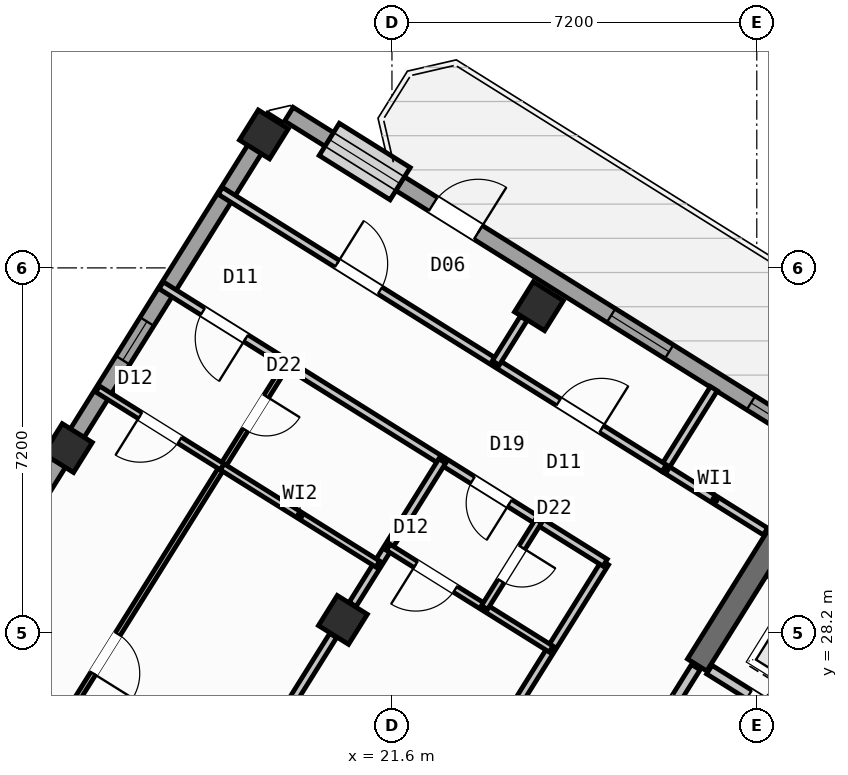
"""IFC4 building model, lengths in metres.
Left out: names, types, materials, properties, quantities, classifications, styles, units other than length and angle.
Written with IfcOpenShell. Run it as: python <this file> out.ifc"""

import sys

from ifc_helpers import new_model, si_unit, direction, frame, frame_2d, origin, origin_2d, place, context, subcontext, project, spatial, rectangle, hollow_rectangle, extrude, source, transform, mapped, element, fill, save


model = new_model("IFC4")
c1 = context("Model", 3, precision=1e-05, world=origin(), true_north=direction((0.0, 1.0)))
c2 = subcontext(c1, "Body", "Model", "MODEL_VIEW")
j1 = project(units=[si_unit("LENGTHUNIT", "METRE"), si_unit("PLANEANGLEUNIT", "RADIAN")], contexts=[c1])
p1 = place(None, origin())
s1 = spatial("IfcSite", under=j1, at=p1, CompositionType="ELEMENT")
p2 = place(p1, origin())
s2 = spatial("IfcBuilding", under=s1, at=p2, CompositionType="ELEMENT")
p3 = place(p2, frame((0.0, 0.0, 288.0)))
s3 = spatial("IfcBuildingStorey", under=s2, at=p3, CompositionType="ELEMENT", Elevation=288.0)
p4 = place(p3, frame((29.544, 30.636, 0.0), z_axis=(0.0, 0.0, 1.0), x_axis=(-0.529902075036, -0.848058836916, 0.0)))
e1 = element("IfcWall", 1, at=p4, inside=s3, PredefinedType="SHEAR", context=c2, shape_type="SweptSolid", body=[
    extrude(rectangle(XDim=3.625, YDim=0.45, at=frame_2d((1.812, 0.0))), origin(), (0.0, 0.0, 1.0), 3.35),
])
m1 = source(origin(), c2, "Body", "SweptSolid", [
    extrude(hollow_rectangle(XDim=0.7, YDim=0.7, WallThickness=0.028, at=origin_2d()), origin(), (0.0, 0.0, 1.0), 3.6),
])
for number, where, z_axis, x_axis in (
    (2, (24.5, 34.643, 0.0), (0.0, 0.0, 1.0), (-0.848, 0.53, 0.0)),
    (3, (20.632, 28.452, 0.0), (0.0, 0.0, 1.0), (-0.848, 0.53, 0.0)),
    (4, (19.073, 38.034, 0.0), (0.0, 0.0, 1.0), (-0.848, 0.53, 0.0)),
    (5, (15.205, 31.844, 0.0), (0.0, 0.0, 1.0), (-0.848, 0.53, 0.0)),
):
    element("IfcColumn", number, at=place(p3, frame(where, z_axis=z_axis, x_axis=x_axis)), inside=s3, PredefinedType="COLUMN", context=c2, shape_type="MappedRepresentation", body=[
        mapped(m1, transform((0.0, 0.0, 0.0), scale=1.0)),
    ])
p5 = place(p3, frame((7.842, 20.061, 0.0), z_axis=(0.0, 0.0, 1.0), x_axis=(0.529915577903, 0.84805039962, 0.0)))
e6 = element("IfcWall", 6, at=p5, inside=s3, PredefinedType="STANDARD", context=c2, shape_type="SweptSolid", body=[
    extrude(rectangle(XDim=21.587, YDim=0.32, at=frame_2d((10.794, 0.0))), origin(), (0.0, 0.0, 1.0), 2.875),
])
p6 = place(p5, frame((2.606, 0.0, 0.9)))
e7 = element("IfcOpeningElement", 7, at=p6, cuts=e6, PredefinedType="OPENING", context=c2, shape_type="SweptSolid", body=[
    extrude(rectangle(XDim=1.65, YDim=1.45, at=frame_2d((0.825, 0.725))), frame((0.0, 0.17, 0.0), z_axis=(0.0, -1.0, 0.0), x_axis=(1.0, 0.0, 0.0)), (0.0, 0.0, 1.0), 0.34),
])
p7 = place(p5, frame((8.094, 0.0, 0.9)))
e8 = element("IfcOpeningElement", 8, at=p7, cuts=e6, PredefinedType="OPENING", context=c2, shape_type="SweptSolid", body=[
    extrude(rectangle(XDim=1.35, YDim=1.45, at=frame_2d((0.675, 0.725))), frame((0.0, 0.17, 0.0), z_axis=(0.0, -1.0, 0.0), x_axis=(1.0, 0.0, 0.0)), (0.0, 0.0, 1.0), 0.34),
])
p8 = place(p5, frame((11.044, 0.0, 0.9)))
e9 = element("IfcOpeningElement", 9, at=p8, cuts=e6, PredefinedType="OPENING", context=c2, shape_type="SweptSolid", body=[
    extrude(rectangle(XDim=1.35, YDim=1.45, at=frame_2d((0.675, 0.725))), frame((0.0, 0.17, 0.0), z_axis=(0.0, -1.0, 0.0), x_axis=(1.0, 0.0, 0.0)), (0.0, 0.0, 1.0), 0.34),
])
p9 = place(p5, frame((15.939, 0.0, 1.0)))
e10 = element("IfcOpeningElement", 10, at=p9, cuts=e6, PredefinedType="OPENING", context=c2, shape_type="SweptSolid", body=[
    extrude(rectangle(XDim=0.9, YDim=1.25, at=frame_2d((0.45, 0.625))), frame((0.0, 0.17, 0.0), z_axis=(0.0, -1.0, 0.0), x_axis=(1.0, 0.0, 0.0)), (0.0, 0.0, 1.0), 0.34),
])
p10 = place(p3, frame((19.566, 38.434, 0.0), z_axis=(0.0, 0.0, 1.0), x_axis=(0.84804567626, -0.529923136858, 0.0)))
e11 = element("IfcWall", 11, at=p10, inside=s3, PredefinedType="STANDARD", context=c2, shape_type="SweptSolid", body=[
    extrude(rectangle(XDim=25.188, YDim=0.32, at=frame_2d((12.594, 0.0))), origin(), (0.0, 0.0, 1.0), 3.35),
])
p11 = place(p10, frame((3.355, 0.0, 0.0)))
e12 = element("IfcOpeningElement", 12, at=p11, cuts=e11, PredefinedType="OPENING", context=c2, shape_type="SweptSolid", body=[
    extrude(rectangle(XDim=1.05, YDim=2.15, at=frame_2d((0.525, 1.075))), frame((0.0, 0.17, 0.0), z_axis=(0.0, -1.0, 0.0), x_axis=(1.0, 0.0, 0.0)), (0.0, 0.0, 1.0), 0.34),
])
p12 = place(p10, frame((0.939, 0.0, 0.9)))
e13 = element("IfcOpeningElement", 13, at=p12, cuts=e11, PredefinedType="OPENING", context=c2, shape_type="SweptSolid", body=[
    extrude(rectangle(XDim=1.65, YDim=1.45, at=frame_2d((0.825, 0.725))), frame((0.0, 0.17, 0.0), z_axis=(0.0, -1.0, 0.0), x_axis=(1.0, 0.0, 0.0)), (0.0, 0.0, 1.0), 0.34),
])
p13 = place(p10, frame((7.499, 0.0, 0.9)))
e14 = element("IfcOpeningElement", 14, at=p13, cuts=e11, PredefinedType="OPENING", context=c2, shape_type="SweptSolid", body=[
    extrude(rectangle(XDim=1.35, YDim=1.45, at=frame_2d((0.675, 0.725))), frame((0.0, 0.17, 0.0), z_axis=(0.0, -1.0, 0.0), x_axis=(1.0, 0.0, 0.0)), (0.0, 0.0, 1.0), 0.34),
])
p14 = place(p10, frame((10.754, 0.0, 1.0)))
e15 = element("IfcOpeningElement", 15, at=p14, cuts=e11, PredefinedType="OPENING", context=c2, shape_type="SweptSolid", body=[
    extrude(rectangle(XDim=0.9, YDim=1.25, at=frame_2d((0.45, 0.625))), frame((0.0, 0.17, 0.0), z_axis=(0.0, -1.0, 0.0), x_axis=(1.0, 0.0, 0.0)), (0.0, 0.0, 1.0), 0.34),
])
p15 = place(p10, frame((15.694, 0.0, 1.0)))
e16 = element("IfcOpeningElement", 16, at=p15, cuts=e11, PredefinedType="OPENING", context=c2, shape_type="SweptSolid", body=[
    extrude(rectangle(XDim=0.9, YDim=1.25, at=frame_2d((0.45, 0.625))), frame((0.0, 0.17, 0.0), z_axis=(0.0, -1.0, 0.0), x_axis=(1.0, 0.0, 0.0)), (0.0, 0.0, 1.0), 0.34),
])
p16 = place(p10, frame((21.394, 0.0, 1.0)))
e17 = element("IfcOpeningElement", 17, at=p16, cuts=e11, PredefinedType="OPENING", context=c2, shape_type="SweptSolid", body=[
    extrude(rectangle(XDim=0.9, YDim=1.25, at=frame_2d((0.45, 0.625))), frame((0.0, 0.17, 0.0), z_axis=(0.0, -1.0, 0.0), x_axis=(1.0, 0.0, 0.0)), (0.0, 0.0, 1.0), 0.34),
])
p17 = place(p3, frame((31.822, 24.998, 0.0), z_axis=(0.0, 0.0, 1.0), x_axis=(-0.848054125777, 0.529909614701, 0.0)))
e18 = element("IfcWall", 18, at=p17, inside=s3, PredefinedType="STANDARD", context=c2, shape_type="SweptSolid", body=[
    extrude(rectangle(XDim=4.668, YDim=0.2, at=frame_2d((2.334, 0.0))), origin(), (0.0, 0.0, 1.0), 3.34),
])
p18 = place(p17, frame((0.52, 0.0, 0.0)))
e19 = element("IfcOpeningElement", 19, at=p18, cuts=e18, PredefinedType="OPENING", context=c2, shape_type="SweptSolid", body=[
    extrude(rectangle(XDim=1.2, YDim=2.15, at=frame_2d((0.6, 1.075))), frame((0.0, 0.11, 0.0), z_axis=(0.0, -1.0, 0.0), x_axis=(1.0, 0.0, 0.0)), (0.0, 0.0, 1.0), 0.22),
])
p19 = place(p17, frame((2.54, 0.0, 0.0)))
e20 = element("IfcOpeningElement", 20, at=p19, cuts=e18, PredefinedType="OPENING", context=c2, shape_type="SweptSolid", body=[
    extrude(rectangle(XDim=1.2, YDim=2.15, at=frame_2d((0.6, 1.075))), frame((0.0, 0.11, 0.0), z_axis=(0.0, -1.0, 0.0), x_axis=(1.0, 0.0, 0.0)), (0.0, 0.0, 1.0), 0.22),
])
p20 = place(p3, frame((27.596, 27.52, 0.0), z_axis=(0.0, 0.0, 1.0), x_axis=(-0.529865479138, -0.848081702443, 0.0)))
e21 = element("IfcWall", 21, at=p20, inside=s3, PredefinedType="STANDARD", context=c2, shape_type="SweptSolid", body=[
    extrude(rectangle(XDim=2.96, YDim=0.2, at=frame_2d((1.48, 0.0))), origin(), (0.0, 0.0, 1.0), 3.34),
])
p21 = place(p20, frame((0.7, 0.0, 0.0)))
e22 = element("IfcOpeningElement", 22, at=p21, cuts=e21, PredefinedType="OPENING", context=c2, shape_type="SweptSolid", body=[
    extrude(rectangle(XDim=1.5, YDim=2.15, at=frame_2d((0.75, 1.075))), frame((0.0, 0.11, 0.0), z_axis=(0.0, -1.0, 0.0), x_axis=(1.0, 0.0, 0.0)), (0.0, 0.0, 1.0), 0.22),
])
p22 = place(p3, frame((28.972, 30.198, 0.0), z_axis=(0.0, 0.0, 1.0), x_axis=(-0.848015752453, 0.529971021464, 0.0)))
e23 = element("IfcWall", 23, at=p22, inside=s3, PredefinedType="PARTITIONING", context=c2, shape_type="SweptSolid", body=[
    extrude(rectangle(XDim=2.358, YDim=0.16, at=frame_2d((1.179, 0.0))), origin(), (0.0, 0.0, 1.0), 3.34),
])
p23 = place(p3, frame((27.953, 33.016, 0.0), z_axis=(0.0, 0.0, 1.0), x_axis=(-0.529880305451, -0.848072439061, 0.0)))
e24 = element("IfcWall", 24, at=p23, inside=s3, PredefinedType="PARTITIONING", context=c2, shape_type="SweptSolid", body=[
    extrude(rectangle(XDim=1.85, YDim=0.16, at=frame_2d((0.925, 0.0))), origin(), (0.0, 0.0, 1.0), 3.34),
])
p24 = place(p3, frame((25.807, 29.582, 0.0), z_axis=(0.0, 0.0, 1.0), x_axis=(-0.529918119251, -0.84804881162, 0.0)))
e25 = element("IfcWall", 25, at=p24, inside=s3, PredefinedType="PARTITIONING", context=c2, shape_type="SweptSolid", body=[
    extrude(rectangle(XDim=17.65, YDim=0.16, at=frame_2d((8.825, 0.0))), origin(), (0.0, 0.0, 1.0), 3.34),
])
p25 = place(p3, frame((26.973, 31.447, 0.0), z_axis=(0.0, 0.0, 1.0), x_axis=(-0.84805406617, 0.529909710094, 0.0)))
e26 = element("IfcWall", 26, at=p25, inside=s3, PredefinedType="PARTITIONING", context=c2, shape_type="SweptSolid", body=[
    extrude(rectangle(XDim=10.33, YDim=0.16, at=frame_2d((5.165, 0.0))), origin(), (0.0, 0.0, 1.0), 3.34),
])
p26 = place(p25, frame((1.459, 0.0, 0.0)))
e27 = element("IfcOpeningElement", 27, at=p26, cuts=e26, PredefinedType="OPENING", context=c2, shape_type="SweptSolid", body=[
    extrude(rectangle(XDim=1.0, YDim=2.1, at=frame_2d((0.5, 1.05))), frame((0.0, 0.09, 0.0), z_axis=(0.0, -1.0, 0.0), x_axis=(1.0, 0.0, 0.0)), (0.0, 0.0, 1.0), 0.18),
])
p27 = place(p25, frame((6.614, 0.0, 0.0)))
e28 = element("IfcOpeningElement", 28, at=p27, cuts=e26, PredefinedType="OPENING", context=c2, shape_type="SweptSolid", body=[
    extrude(rectangle(XDim=1.0, YDim=2.1, at=frame_2d((0.5, 1.05))), frame((0.0, 0.09, 0.0), z_axis=(0.0, -1.0, 0.0), x_axis=(1.0, 0.0, 0.0)), (0.0, 0.0, 1.0), 0.18),
])
p28 = place(p3, frame((25.807, 29.582, 0.0), z_axis=(0.0, 0.0, 1.0), x_axis=(-0.848060702647, 0.529899089097, 0.0)))
e29 = element("IfcWall", 29, at=p28, inside=s3, PredefinedType="PARTITIONING", context=c2, shape_type="SweptSolid", body=[
    extrude(rectangle(XDim=10.33, YDim=0.16, at=frame_2d((5.165, 0.0))), origin(), (0.0, 0.0, 1.0), 3.34),
])
p29 = place(p28, frame((2.22, 0.0, 0.0)))
e30 = element("IfcOpeningElement", 30, at=p29, cuts=e29, PredefinedType="OPENING", context=c2, shape_type="SweptSolid", body=[
    extrude(rectangle(XDim=0.86, YDim=2.05, at=frame_2d((0.43, 1.025))), frame((0.0, 0.09, 0.0), z_axis=(0.0, -1.0, 0.0), x_axis=(1.0, 0.0, 0.0)), (0.0, 0.0, 1.0), 0.18),
])
p30 = place(p28, frame((8.36, 0.0, 0.0)))
e31 = element("IfcOpeningElement", 31, at=p30, cuts=e29, PredefinedType="OPENING", context=c2, shape_type="SweptSolid", body=[
    extrude(rectangle(XDim=1.0, YDim=2.1, at=frame_2d((0.5, 1.05))), frame((0.0, 0.09, 0.0), z_axis=(0.0, -1.0, 0.0), x_axis=(1.0, 0.0, 0.0)), (0.0, 0.0, 1.0), 0.18),
])
p31 = place(p3, frame((22.593, 31.59, 0.0), z_axis=(0.0, 0.0, 1.0), x_axis=(-0.529900320499, -0.848059933221, 0.0)))
e32 = element("IfcWall", 32, at=p31, inside=s3, PredefinedType="PARTITIONING", context=c2, shape_type="SweptSolid", body=[
    extrude(rectangle(XDim=3.338, YDim=0.16, at=frame_2d((1.669, 0.0))), origin(), (0.0, 0.0, 1.0), 2.875),
])
p32 = place(p3, frame((20.44, 28.145, 0.0), z_axis=(0.0, 0.0, 1.0), x_axis=(-0.529938869374, -0.84803584519, 0.0)))
e33 = element("IfcWall", 33, at=p32, inside=s3, PredefinedType="PARTITIONING", context=c2, shape_type="SweptSolid", body=[
    extrude(rectangle(XDim=6.576, YDim=0.16, at=frame_2d((3.288, 0.0))), origin(), (0.0, 0.0, 1.0), 2.875),
])
p33 = place(p3, frame((24.742, 27.877, 0.0), z_axis=(0.0, 0.0, 1.0), x_axis=(-0.848059820872, 0.529900500304, 0.0)))
e34 = element("IfcWall", 34, at=p33, inside=s3, PredefinedType="PLUMBINGWALL", context=c2, shape_type="SweptSolid", body=[
    extrude(rectangle(XDim=3.79, YDim=0.14, at=frame_2d((1.895, 0.0))), origin(), (0.0, 0.0, 1.0), 3.34),
])
p34 = place(p33, frame((2.23, 0.0, 0.0)))
e35 = element("IfcOpeningElement", 35, at=p34, cuts=e34, PredefinedType="OPENING", context=c2, shape_type="SweptSolid", body=[
    extrude(rectangle(XDim=0.92, YDim=2.08, at=frame_2d((0.46, 1.04))), frame((0.0, 0.08, 0.0), z_axis=(0.0, -1.0, 0.0), x_axis=(1.0, 0.0, 0.0)), (0.0, 0.0, 1.0), 0.16),
])
p35 = place(p3, frame((24.492, 30.403, 0.0), z_axis=(0.0, 0.0, 1.0), x_axis=(-0.529933431478, -0.848039243315, 0.0)))
e36 = element("IfcWall", 36, at=p35, inside=s3, PredefinedType="PLUMBINGWALL", context=c2, shape_type="SweptSolid", body=[
    extrude(rectangle(XDim=2.01, YDim=0.14, at=frame_2d((1.005, 0.0))), origin(), (0.0, 0.0, 1.0), 3.025),
])
p36 = place(p35, frame((0.615, 0.0, 0.0)))
e37 = element("IfcOpeningElement", 37, at=p36, cuts=e36, PredefinedType="OPENING", context=c2, shape_type="SweptSolid", body=[
    extrude(rectangle(XDim=0.78, YDim=2.05, at=frame_2d((0.39, 1.025))), frame((0.0, 0.08, 0.0), z_axis=(0.0, -1.0, 0.0), x_axis=(1.0, 0.0, 0.0)), (0.0, 0.0, 1.0), 0.16),
])
p37 = place(p3, frame((19.523, 33.508, 0.0), z_axis=(0.0, 0.0, 1.0), x_axis=(-0.529910765222, -0.848053406869, 0.0)))
e38 = element("IfcWall", 38, at=p37, inside=s3, PredefinedType="PARTITIONING", context=c2, shape_type="SweptSolid", body=[
    extrude(rectangle(XDim=17.92, YDim=0.11, at=frame_2d((8.96, 0.0))), origin(), (0.0, 0.0, 1.0), 3.34),
])
p38 = place(p37, frame((0.76, 0.0, 0.0)))
e39 = element("IfcOpeningElement", 39, at=p38, cuts=e38, PredefinedType="OPENING", context=c2, shape_type="SweptSolid", body=[
    extrude(rectangle(XDim=0.78, YDim=2.05, at=frame_2d((0.39, 1.025))), frame((0.0, 0.065, 0.0), z_axis=(0.0, -1.0, 0.0), x_axis=(1.0, 0.0, 0.0)), (0.0, 0.0, 1.0), 0.13),
])
p39 = place(p37, frame((6.289, 0.0, 0.0)))
e40 = element("IfcOpeningElement", 40, at=p39, cuts=e38, PredefinedType="OPENING", context=c2, shape_type="SweptSolid", body=[
    extrude(rectangle(XDim=0.92, YDim=2.08, at=frame_2d((0.46, 1.04))), frame((0.0, 0.065, 0.0), z_axis=(0.0, -1.0, 0.0), x_axis=(1.0, 0.0, 0.0)), (0.0, 0.0, 1.0), 0.13),
])
p40 = place(p3, frame((18.251, 31.473, 0.0), z_axis=(0.0, 0.0, 1.0), x_axis=(-0.848059786386, 0.529900555496, 0.0)))
e41 = element("IfcWall", 41, at=p40, inside=s3, PredefinedType="PLUMBINGWALL", context=c2, shape_type="SweptSolid", body=[
    extrude(rectangle(XDim=2.9, YDim=0.14, at=frame_2d((1.45, 0.0))), origin(), (0.0, 0.0, 1.0), 3.34),
])
p41 = place(p40, frame((0.99, 0.0, 0.0)))
e42 = element("IfcOpeningElement", 42, at=p41, cuts=e41, PredefinedType="OPENING", context=c2, shape_type="SweptSolid", body=[
    extrude(rectangle(XDim=0.92, YDim=2.08, at=frame_2d((0.46, 1.04))), frame((0.0, 0.08, 0.0), z_axis=(0.0, -1.0, 0.0), x_axis=(1.0, 0.0, 0.0)), (0.0, 0.0, 1.0), 0.16),
])
p42 = place(p3, frame((21.321, 29.554, 0.0), z_axis=(0.0, 0.0, 1.0), x_axis=(-0.848021036626, 0.529962566074, 0.0)))
e43 = element("IfcWall", 43, at=p42, inside=s3, PredefinedType="PLUMBINGWALL", context=c2, shape_type="SweptSolid", body=[
    extrude(rectangle(XDim=3.62, YDim=0.14, at=frame_2d((1.81, 0.0))), origin(), (0.0, 0.0, 1.0), 3.34),
])
p43 = place(p3, frame((24.2, 34.404, 0.0), z_axis=(0.0, 0.0, 1.0), x_axis=(-0.529977795385, -0.848011519025, 0.0)))
e44 = element("IfcWall", 44, at=p43, inside=s3, PredefinedType="PARTITIONING", context=c2, shape_type="SweptSolid", body=[
    extrude(rectangle(XDim=1.038, YDim=0.16, at=frame_2d((0.519, 0.0))), origin(), (0.0, 0.0, 1.0), 2.875),
])
m2 = source(origin(), c2, "Body", "SweptSolid", [
    extrude(rectangle(XDim=1.05, YDim=2.15, at=frame_2d((0.525, 1.075))), frame((0.0, 0.025, 0.0), z_axis=(0.0, -1.0, 0.0), x_axis=(1.0, 0.0, 0.0)), (0.0, 0.0, 1.0), 0.05),
])
p44 = place(p11, origin())
e45 = element("IfcDoor", 45, at=p44, inside=s3, OperationType="SINGLE_SWING_RIGHT", PredefinedType="DOOR", context=c2, shape_type="MappedRepresentation", body=[
    mapped(m2, transform((0.0, 0.0, 0.0), scale=1.0)),
])
fill(e12, e45)
m3 = source(origin(), c2, "Body", "SweptSolid", [
    extrude(rectangle(XDim=0.9, YDim=1.25, at=frame_2d((0.45, 0.625))), frame((0.0, 0.03, 0.0), z_axis=(0.0, -1.0, 0.0), x_axis=(1.0, 0.0, 0.0)), (0.0, 0.0, 1.0), 0.06),
])
p45 = place(p9, origin())
e46 = element("IfcWindow", 46, at=p45, inside=s3, PartitioningType="SINGLE_PANEL", PredefinedType="WINDOW", context=c2, shape_type="MappedRepresentation", body=[
    mapped(m3, transform((0.0, 0.0, 0.0), scale=1.0)),
])
fill(e10, e46)
m4 = source(origin(), c2, "Body", "SweptSolid", [
    extrude(rectangle(XDim=1.65, YDim=1.45, at=frame_2d((0.825, 0.725))), frame((0.0, 0.03, 0.0), z_axis=(0.0, -1.0, 0.0), x_axis=(1.0, 0.0, 0.0)), (0.0, 0.0, 1.0), 0.06),
])
p46 = place(p12, origin())
e47 = element("IfcWindow", 47, at=p46, inside=s3, PartitioningType="SINGLE_PANEL", PredefinedType="WINDOW", context=c2, shape_type="MappedRepresentation", body=[
    mapped(m4, transform((0.0, 0.0, 0.0), scale=1.0)),
])
fill(e13, e47)
m5 = source(origin(), c2, "Body", "SweptSolid", [
    extrude(rectangle(XDim=1.35, YDim=1.45, at=frame_2d((0.675, 0.725))), frame((0.0, 0.03, 0.0), z_axis=(0.0, -1.0, 0.0), x_axis=(1.0, 0.0, 0.0)), (0.0, 0.0, 1.0), 0.06),
])
p47 = place(p13, origin())
e48 = element("IfcWindow", 48, at=p47, inside=s3, PartitioningType="SINGLE_PANEL", PredefinedType="WINDOW", context=c2, shape_type="MappedRepresentation", body=[
    mapped(m5, transform((0.0, 0.0, 0.0), scale=1.0)),
])
fill(e14, e48)
p48 = place(p14, origin())
e49 = element("IfcWindow", 49, at=p48, inside=s3, PartitioningType="SINGLE_PANEL", PredefinedType="WINDOW", context=c2, shape_type="MappedRepresentation", body=[
    mapped(m3, transform((0.0, 0.0, 0.0), scale=1.0)),
])
fill(e15, e49)
m6 = source(origin(), c2, "Body", "SweptSolid", [
    extrude(rectangle(XDim=1.2, YDim=2.15, at=frame_2d((0.6, 1.075))), frame((0.0, 0.025, 0.0), z_axis=(0.0, -1.0, 0.0), x_axis=(1.0, 0.0, 0.0)), (0.0, 0.0, 1.0), 0.05),
])
p49 = place(p19, origin())
e50 = element("IfcDoor", 50, at=p49, inside=s3, OperationType="DOUBLE_DOOR_SLIDING", PredefinedType="DOOR", context=c2, shape_type="MappedRepresentation", body=[
    mapped(m6, transform((0.0, 0.0, 0.0), scale=1.0)),
])
fill(e20, e50)
m7 = source(origin(), c2, "Body", "SweptSolid", [
    extrude(rectangle(XDim=0.86, YDim=2.05, at=frame_2d((0.43, 1.025))), frame((0.0, 0.025, 0.0), z_axis=(0.0, -1.0, 0.0), x_axis=(1.0, 0.0, 0.0)), (0.0, 0.0, 1.0), 0.05),
])
p50 = place(p29, origin())
e51 = element("IfcDoor", 51, at=p50, inside=s3, OperationType="SINGLE_SWING_LEFT", PredefinedType="DOOR", context=c2, shape_type="MappedRepresentation", body=[
    mapped(m7, transform((0.0, 0.0, 0.0), scale=1.0)),
])
fill(e30, e51)
m8 = source(origin(), c2, "Body", "SweptSolid", [
    extrude(rectangle(XDim=0.92, YDim=2.08, at=frame_2d((0.46, 1.04))), frame((0.0, 0.025, 0.0), z_axis=(0.0, -1.0, 0.0), x_axis=(1.0, 0.0, 0.0)), (0.0, 0.0, 1.0), 0.05),
])
p51 = place(p34, origin())
e52 = element("IfcDoor", 52, at=p51, inside=s3, OperationType="SINGLE_SWING_RIGHT", PredefinedType="DOOR", context=c2, shape_type="MappedRepresentation", body=[
    mapped(m8, transform((0.0, 0.0, 0.0), scale=1.0)),
])
fill(e35, e52)
m9 = source(origin(), c2, "Body", "SweptSolid", [
    extrude(rectangle(XDim=0.78, YDim=2.05, at=frame_2d((0.39, 1.025))), frame((0.0, 0.025, 0.0), z_axis=(0.0, -1.0, 0.0), x_axis=(1.0, 0.0, 0.0)), (0.0, 0.0, 1.0), 0.05),
])
p52 = place(p36, origin())
e53 = element("IfcDoor", 53, at=p52, inside=s3, OperationType="SINGLE_SWING_LEFT", PredefinedType="DOOR", context=c2, shape_type="MappedRepresentation", body=[
    mapped(m9, transform((0.0, 0.0, 0.0), scale=1.0)),
])
fill(e37, e53)
m10 = source(origin(), c2, "Body", "SweptSolid", [
    extrude(rectangle(XDim=1.0, YDim=2.1, at=frame_2d((0.5, 1.05))), frame((0.0, 0.025, 0.0), z_axis=(0.0, -1.0, 0.0), x_axis=(1.0, 0.0, 0.0)), (0.0, 0.0, 1.0), 0.05),
])
p53 = place(p30, origin())
e54 = element("IfcDoor", 54, at=p53, inside=s3, OperationType="SINGLE_SWING_LEFT", PredefinedType="DOOR", context=c2, shape_type="MappedRepresentation", body=[
    mapped(m10, transform((0.0, 0.0, 0.0), scale=1.0)),
])
fill(e31, e54)
p54 = place(p41, origin())
e55 = element("IfcDoor", 55, at=p54, inside=s3, OperationType="SINGLE_SWING_RIGHT", PredefinedType="DOOR", context=c2, shape_type="MappedRepresentation", body=[
    mapped(m8, transform((0.0, 0.0, 0.0), scale=1.0)),
])
fill(e42, e55)
p55 = place(p38, origin())
e56 = element("IfcDoor", 56, at=p55, inside=s3, OperationType="SINGLE_SWING_LEFT", PredefinedType="DOOR", context=c2, shape_type="MappedRepresentation", body=[
    mapped(m9, transform((0.0, 0.0, 0.0), scale=1.0)),
])
fill(e39, e56)
p56 = place(p39, origin())
e57 = element("IfcDoor", 57, at=p56, inside=s3, OperationType="SINGLE_SWING_RIGHT", PredefinedType="DOOR", context=c2, shape_type="MappedRepresentation", body=[
    mapped(m8, transform((0.0, 0.0, 0.0), scale=1.0)),
])
fill(e40, e57)
p57 = place(p26, frame((1.0, 0.0, 0.0), z_axis=(0.0, 0.0, 1.0), x_axis=(-1.0, 0.0, 0.0)))
e58 = element("IfcDoor", 58, at=p57, inside=s3, OperationType="SINGLE_SWING_RIGHT", PredefinedType="DOOR", context=c2, shape_type="MappedRepresentation", body=[
    mapped(m10, transform((0.0, 0.0, 0.0), scale=1.0)),
])
fill(e27, e58)
p58 = place(p27, frame((1.0, 0.0, 0.0), z_axis=(0.0, 0.0, 1.0), x_axis=(-1.0, 0.0, 0.0)))
e59 = element("IfcDoor", 59, at=p58, inside=s3, OperationType="SINGLE_SWING_LEFT", PredefinedType="DOOR", context=c2, shape_type="MappedRepresentation", body=[
    mapped(m10, transform((0.0, 0.0, 0.0), scale=1.0)),
])
fill(e28, e59)
save(model, sys.argv[1])
